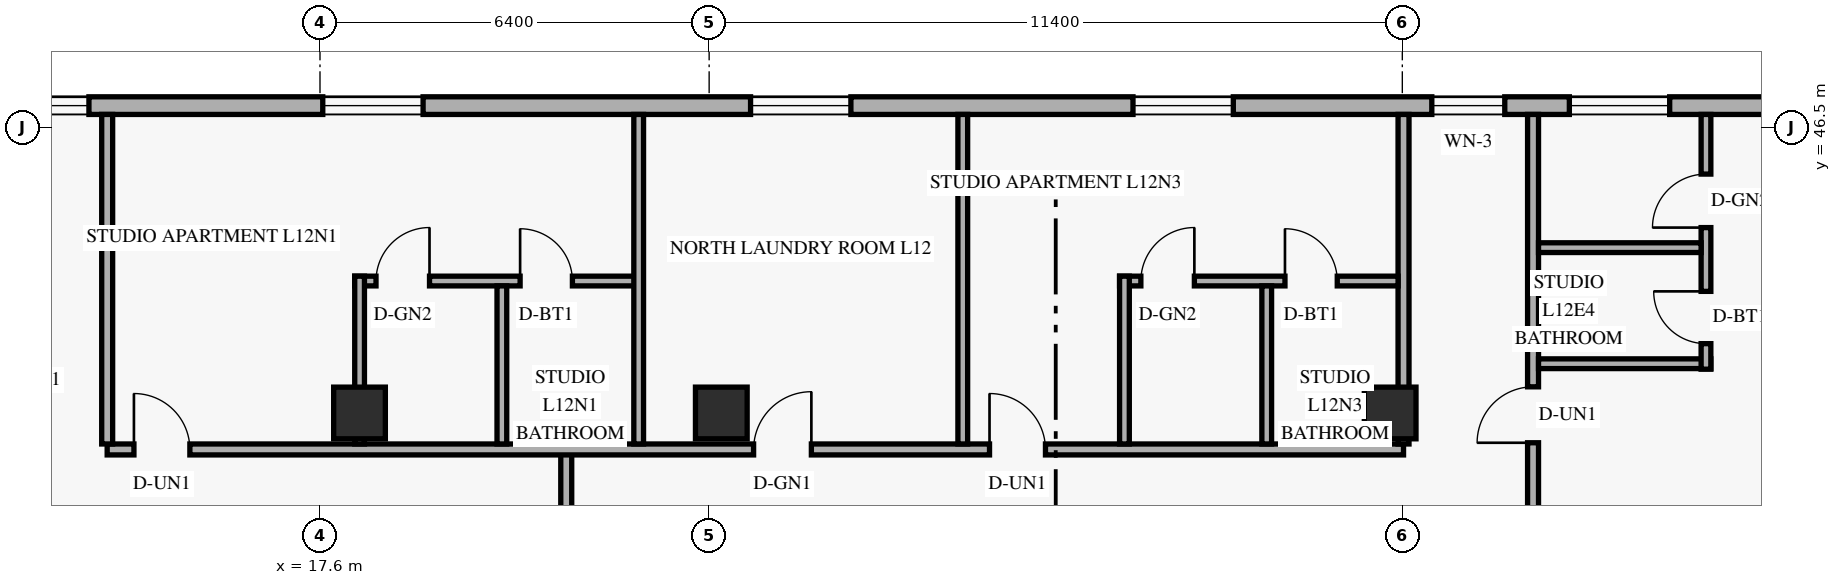
"""IFC4 building model, lengths in metres.
Left out: names, types, materials, properties, quantities, classifications, styles, units other than length and angle.
Written with IfcOpenShell. Run it as: python <this file> out.ifc"""

import sys

from ifc_helpers import new_model, si_unit, direction, frame, frame_2d, origin, origin_2d, place, context, subcontext, project, spatial, rectangle, extrude, element, fill, save


model = new_model("IFC4")
c1 = context("Model", 3, precision=1e-05, world=origin(), true_north=direction((0.0, 1.0)))
c2 = subcontext(c1, "Body", "Model", "MODEL_VIEW")
j1 = project(units=[si_unit("LENGTHUNIT", "METRE"), si_unit("PLANEANGLEUNIT", "RADIAN")], contexts=[c1])
p1 = place(None, origin())
s1 = spatial("IfcSite", under=j1, at=p1, CompositionType="ELEMENT")
p2 = place(p1, origin())
s2 = spatial("IfcBuilding", under=s1, at=p2, CompositionType="ELEMENT")
p3 = place(p2, frame((0.0, 0.0, 49.2)))
s3 = spatial("IfcBuildingStorey", under=s2, at=p3, CompositionType="ELEMENT", Elevation=49.2)
for number, where, z_axis, x_axis in (
    (1, (18.25, 41.8, 0.0), (0.0, 0.0, 1.0), (1.0, 0.0, 0.0)),
    (2, (24.2, 41.8, 0.0), (0.0, 0.0, 1.0), (1.0, 0.0, 0.0)),
    (3, (35.2, 41.8, 0.0), (0.0, 0.0, 1.0), (1.0, 0.0, 0.0)),
):
    element("IfcColumn", number, at=place(p3, frame(where, z_axis=z_axis, x_axis=x_axis)), inside=s3, PredefinedType="COLUMN", context=c2, shape_type="SweptSolid", body=[
        extrude(rectangle(XDim=0.85, YDim=0.85, at=origin_2d()), origin(), (0.0, 0.0, 1.0), 3.6),
    ])
p4 = place(p3, frame((44.98, 46.855, 0.0), z_axis=(0.0, 0.0, 1.0), x_axis=(-1.0, 0.0, 0.0)))
e4 = element("IfcWall", 4, at=p4, inside=s3, PredefinedType="SOLIDWALL", context=c2, shape_type="SweptSolid", body=[
    extrude(rectangle(XDim=39.56, YDim=0.29, at=frame_2d((19.78, 0.0))), origin(), (0.0, 0.0, 1.0), 3.36),
])
p5 = place(p4, frame((35.295, 0.0, 0.85)))
e5 = element("IfcOpeningElement", 5, at=p5, cuts=e4, PredefinedType="OPENING", context=c2, shape_type="SweptSolid", body=[
    extrude(rectangle(XDim=1.65, YDim=1.6, at=frame_2d((0.825, 0.8))), frame((0.0, 0.155, 0.0), z_axis=(0.0, -1.0, 0.0), x_axis=(1.0, 0.0, 0.0)), (0.0, 0.0, 1.0), 0.31),
])
p6 = place(p4, frame((31.18, 0.0, 0.85)))
e6 = element("IfcOpeningElement", 6, at=p6, cuts=e4, PredefinedType="OPENING", context=c2, shape_type="SweptSolid", body=[
    extrude(rectangle(XDim=1.2, YDim=1.5, at=frame_2d((0.6, 0.75))), frame((0.0, 0.155, 0.0), z_axis=(0.0, -1.0, 0.0), x_axis=(1.0, 0.0, 0.0)), (0.0, 0.0, 1.0), 0.31),
])
p7 = place(p4, frame((25.684, 0.0, 0.85)))
e7 = element("IfcOpeningElement", 7, at=p7, cuts=e4, PredefinedType="OPENING", context=c2, shape_type="SweptSolid", body=[
    extrude(rectangle(XDim=1.65, YDim=1.6, at=frame_2d((0.825, 0.8))), frame((0.0, 0.155, 0.0), z_axis=(0.0, -1.0, 0.0), x_axis=(1.0, 0.0, 0.0)), (0.0, 0.0, 1.0), 0.31),
])
p8 = place(p4, frame((18.649, 0.0, 0.85)))
e8 = element("IfcOpeningElement", 8, at=p8, cuts=e4, PredefinedType="OPENING", context=c2, shape_type="SweptSolid", body=[
    extrude(rectangle(XDim=1.65, YDim=1.6, at=frame_2d((0.825, 0.8))), frame((0.0, 0.155, 0.0), z_axis=(0.0, -1.0, 0.0), x_axis=(1.0, 0.0, 0.0)), (0.0, 0.0, 1.0), 0.31),
])
p9 = place(p4, frame((12.359, 0.0, 0.85)))
e9 = element("IfcOpeningElement", 9, at=p9, cuts=e4, PredefinedType="OPENING", context=c2, shape_type="SweptSolid", body=[
    extrude(rectangle(XDim=1.65, YDim=1.6, at=frame_2d((0.825, 0.8))), frame((0.0, 0.155, 0.0), z_axis=(0.0, -1.0, 0.0), x_axis=(1.0, 0.0, 0.0)), (0.0, 0.0, 1.0), 0.31),
])
p10 = place(p4, frame((7.895, 0.0, 0.85)))
e10 = element("IfcOpeningElement", 10, at=p10, cuts=e4, PredefinedType="OPENING", context=c2, shape_type="SweptSolid", body=[
    extrude(rectangle(XDim=1.2, YDim=1.5, at=frame_2d((0.6, 0.75))), frame((0.0, 0.155, 0.0), z_axis=(0.0, -1.0, 0.0), x_axis=(1.0, 0.0, 0.0)), (0.0, 0.0, 1.0), 0.31),
])
p11 = place(p4, frame((5.183, 0.0, 0.85)))
e11 = element("IfcOpeningElement", 11, at=p11, cuts=e4, PredefinedType="OPENING", context=c2, shape_type="SweptSolid", body=[
    extrude(rectangle(XDim=1.65, YDim=1.6, at=frame_2d((0.825, 0.8))), frame((0.0, 0.155, 0.0), z_axis=(0.0, -1.0, 0.0), x_axis=(1.0, 0.0, 0.0)), (0.0, 0.0, 1.0), 0.31),
])
p12 = place(p4, frame((1.468, 0.0, 0.85)))
e12 = element("IfcOpeningElement", 12, at=p12, cuts=e4, PredefinedType="OPENING", context=c2, shape_type="SweptSolid", body=[
    extrude(rectangle(XDim=1.65, YDim=1.6, at=frame_2d((0.825, 0.8))), frame((0.0, 0.155, 0.0), z_axis=(0.0, -1.0, 0.0), x_axis=(1.0, 0.0, 0.0)), (0.0, 0.0, 1.0), 0.31),
])
p13 = place(p3, frame((37.55, 1.29, 0.0), z_axis=(0.0, 0.0, 1.0), x_axis=(0.0, 1.0, 0.0)))
e13 = element("IfcWall", 13, at=p13, inside=s3, PredefinedType="STANDARD", context=c2, shape_type="SweptSolid", body=[
    extrude(rectangle(XDim=45.42, YDim=0.18, at=frame_2d((22.71, 0.0))), origin(), (0.0, 0.0, 1.0), 2.649),
])
p14 = place(p13, frame((4.46, 0.0, 0.0)))
e14 = element("IfcOpeningElement", 14, at=p14, cuts=e13, PredefinedType="OPENING", context=c2, shape_type="SweptSolid", body=[
    extrude(rectangle(XDim=0.92, YDim=2.15, at=frame_2d((0.46, 1.075))), frame((0.0, 0.1, 0.0), z_axis=(0.0, -1.0, 0.0), x_axis=(1.0, 0.0, 0.0)), (0.0, 0.0, 1.0), 0.2),
])
p15 = place(p13, frame((14.37, 0.0, 0.0)))
e15 = element("IfcOpeningElement", 15, at=p15, cuts=e13, PredefinedType="OPENING", context=c2, shape_type="SweptSolid", body=[
    extrude(rectangle(XDim=0.92, YDim=2.15, at=frame_2d((0.46, 1.075))), frame((0.0, 0.1, 0.0), z_axis=(0.0, -1.0, 0.0), x_axis=(1.0, 0.0, 0.0)), (0.0, 0.0, 1.0), 0.2),
])
p16 = place(p13, frame((25.87, 0.0, 0.0)))
e16 = element("IfcOpeningElement", 16, at=p16, cuts=e13, PredefinedType="OPENING", context=c2, shape_type="SweptSolid", body=[
    extrude(rectangle(XDim=0.92, YDim=2.15, at=frame_2d((0.46, 1.075))), frame((0.0, 0.1, 0.0), z_axis=(0.0, -1.0, 0.0), x_axis=(1.0, 0.0, 0.0)), (0.0, 0.0, 1.0), 0.2),
])
p17 = place(p13, frame((40.02, 0.0, 0.0)))
e17 = element("IfcOpeningElement", 17, at=p17, cuts=e13, PredefinedType="OPENING", context=c2, shape_type="SweptSolid", body=[
    extrude(rectangle(XDim=0.92, YDim=2.15, at=frame_2d((0.46, 1.075))), frame((0.0, 0.1, 0.0), z_axis=(0.0, -1.0, 0.0), x_axis=(1.0, 0.0, 0.0)), (0.0, 0.0, 1.0), 0.2),
])
p18 = place(p3, frame((21.65, 6.8, 0.0), z_axis=(0.0, 0.0, 1.0), x_axis=(0.0, 1.0, 0.0)))
e18 = element("IfcWall", 18, at=p18, inside=s3, PredefinedType="STANDARD", context=c2, shape_type="SweptSolid", body=[
    extrude(rectangle(XDim=34.4, YDim=0.18, at=frame_2d((17.2, 0.0))), origin(), (0.0, 0.0, 1.0), 2.649),
])
p19 = place(p3, frame((14.1, 41.2, 0.0), z_axis=(0.0, 0.0, 1.0), x_axis=(1.0, 0.0, 0.0)))
e19 = element("IfcWall", 19, at=p19, inside=s3, PredefinedType="STANDARD", context=c2, shape_type="SweptSolid", body=[
    extrude(rectangle(XDim=21.32, YDim=0.18, at=frame_2d((10.66, 0.0))), origin(), (0.0, 0.0, 1.0), 2.649),
])
p20 = place(p19, frame((0.44, 0.0, 0.0)))
e20 = element("IfcOpeningElement", 20, at=p20, cuts=e19, PredefinedType="OPENING", context=c2, shape_type="SweptSolid", body=[
    extrude(rectangle(XDim=0.92, YDim=2.15, at=frame_2d((0.46, 1.075))), frame((0.0, 0.1, 0.0), z_axis=(0.0, -1.0, 0.0), x_axis=(1.0, 0.0, 0.0)), (0.0, 0.0, 1.0), 0.2),
])
p21 = place(p19, frame((10.631, 0.0, 0.0)))
e21 = element("IfcOpeningElement", 21, at=p21, cuts=e19, PredefinedType="OPENING", context=c2, shape_type="SweptSolid", body=[
    extrude(rectangle(XDim=0.95, YDim=2.15, at=frame_2d((0.475, 1.075))), frame((0.0, 0.1, 0.0), z_axis=(0.0, -1.0, 0.0), x_axis=(1.0, 0.0, 0.0)), (0.0, 0.0, 1.0), 0.2),
])
p22 = place(p19, frame((14.511, 0.0, 0.0)))
e22 = element("IfcOpeningElement", 22, at=p22, cuts=e19, PredefinedType="OPENING", context=c2, shape_type="SweptSolid", body=[
    extrude(rectangle(XDim=0.92, YDim=2.15, at=frame_2d((0.46, 1.075))), frame((0.0, 0.1, 0.0), z_axis=(0.0, -1.0, 0.0), x_axis=(1.0, 0.0, 0.0)), (0.0, 0.0, 1.0), 0.2),
])
p23 = place(p3, frame((35.42, 41.29, 0.0), z_axis=(0.0, 0.0, 1.0), x_axis=(0.0, 1.0, 0.0)))
e23 = element("IfcWall", 23, at=p23, inside=s3, PredefinedType="PARTITIONING", context=c2, shape_type="SweptSolid", body=[
    extrude(rectangle(XDim=5.42, YDim=0.18, at=frame_2d((2.71, 0.0))), origin(), (0.0, 0.0, 1.0), 3.36),
])
p24 = place(p3, frame((14.1, 41.29, 0.0), z_axis=(0.0, 0.0, 1.0), x_axis=(0.0, 1.0, 0.0)))
e24 = element("IfcWall", 24, at=p24, inside=s3, PredefinedType="PARTITIONING", context=c2, shape_type="SweptSolid", body=[
    extrude(rectangle(XDim=5.42, YDim=0.18, at=frame_2d((2.71, 0.0))), origin(), (0.0, 0.0, 1.0), 2.809),
])
p25 = place(p3, frame((37.64, 42.61, 0.0), z_axis=(0.0, 0.0, 1.0), x_axis=(1.0, 0.0, 0.0)))
e25 = element("IfcWall", 25, at=p25, inside=s3, PredefinedType="PLUMBINGWALL", context=c2, shape_type="SweptSolid", body=[
    extrude(rectangle(XDim=2.834, YDim=0.16, at=frame_2d((1.417, 0.0))), origin(), (0.0, 0.0, 1.0), 3.36),
])
p26 = place(p3, frame((40.394, 42.52, 0.0), z_axis=(0.0, 0.0, 1.0), x_axis=(0.0, 1.0, 0.0)))
e26 = element("IfcWall", 26, at=p26, inside=s3, PredefinedType="PLUMBINGWALL", context=c2, shape_type="SweptSolid", body=[
    extrude(rectangle(XDim=4.19, YDim=0.16, at=frame_2d((2.095, 0.0))), origin(), (0.0, 0.0, 1.0), 3.36),
])
p27 = place(p26, frame((0.42, 0.0, 0.0)))
e27 = element("IfcOpeningElement", 27, at=p27, cuts=e26, PredefinedType="OPENING", context=c2, shape_type="SweptSolid", body=[
    extrude(rectangle(XDim=0.86, YDim=2.12, at=frame_2d((0.43, 1.06))), frame((0.0, 0.09, 0.0), z_axis=(0.0, -1.0, 0.0), x_axis=(1.0, 0.0, 0.0)), (0.0, 0.0, 1.0), 0.18),
])
p28 = place(p26, frame((2.329, 0.0, 0.0)))
e28 = element("IfcOpeningElement", 28, at=p28, cuts=e26, PredefinedType="OPENING", context=c2, shape_type="SweptSolid", body=[
    extrude(rectangle(XDim=0.88, YDim=2.12, at=frame_2d((0.44, 1.06))), frame((0.0, 0.09, 0.0), z_axis=(0.0, -1.0, 0.0), x_axis=(1.0, 0.0, 0.0)), (0.0, 0.0, 1.0), 0.18),
])
p29 = place(p3, frame((37.64, 44.519, 0.0), z_axis=(0.0, 0.0, 1.0), x_axis=(1.0, 0.0, 0.0)))
e29 = element("IfcWall", 29, at=p29, inside=s3, PredefinedType="PLUMBINGWALL", context=c2, shape_type="SweptSolid", body=[
    extrude(rectangle(XDim=2.674, YDim=0.16, at=frame_2d((1.337, 0.0))), origin(), (0.0, 0.0, 1.0), 3.36),
])
p30 = place(p3, frame((18.171, 43.97, 0.0), z_axis=(0.0, 0.0, 1.0), x_axis=(1.0, 0.0, 0.0)))
e30 = element("IfcWall", 30, at=p30, inside=s3, PredefinedType="PLUMBINGWALL", context=c2, shape_type="SweptSolid", body=[
    extrude(rectangle(XDim=4.67, YDim=0.16, at=frame_2d((2.335, 0.0))), origin(), (0.0, 0.0, 1.0), 3.36),
])
p31 = place(p30, frame((0.35, 0.0, 0.0)))
e31 = element("IfcOpeningElement", 31, at=p31, cuts=e30, PredefinedType="OPENING", context=c2, shape_type="SweptSolid", body=[
    extrude(rectangle(XDim=0.88, YDim=2.12, at=frame_2d((0.44, 1.06))), frame((0.0, 0.09, 0.0), z_axis=(0.0, -1.0, 0.0), x_axis=(1.0, 0.0, 0.0)), (0.0, 0.0, 1.0), 0.18),
])
p32 = place(p30, frame((2.72, 0.0, 0.0)))
e32 = element("IfcOpeningElement", 32, at=p32, cuts=e30, PredefinedType="OPENING", context=c2, shape_type="SweptSolid", body=[
    extrude(rectangle(XDim=0.86, YDim=2.12, at=frame_2d((0.43, 1.06))), frame((0.0, 0.09, 0.0), z_axis=(0.0, -1.0, 0.0), x_axis=(1.0, 0.0, 0.0)), (0.0, 0.0, 1.0), 0.18),
])
p33 = place(p3, frame((18.251, 41.29, 0.0), z_axis=(0.0, 0.0, 1.0), x_axis=(0.0, 1.0, 0.0)))
e33 = element("IfcWall", 33, at=p33, inside=s3, PredefinedType="PLUMBINGWALL", context=c2, shape_type="SweptSolid", body=[
    extrude(rectangle(XDim=2.76, YDim=0.16, at=frame_2d((1.38, 0.0))), origin(), (0.0, 0.0, 1.0), 2.649),
])
p34 = place(p3, frame((20.591, 41.29, 0.0), z_axis=(0.0, 0.0, 1.0), x_axis=(0.0, 1.0, 0.0)))
e34 = element("IfcWall", 34, at=p34, inside=s3, PredefinedType="PLUMBINGWALL", context=c2, shape_type="SweptSolid", body=[
    extrude(rectangle(XDim=2.6, YDim=0.16, at=frame_2d((1.3, 0.0))), origin(), (0.0, 0.0, 1.0), 2.809),
])
for number, where, z_axis, x_axis in (
    (35, (22.841, 41.29, 0.0), (0.0, 0.0, 1.0), (0.0, 1.0, 0.0)),
    (36, (28.171, 41.29, 0.0), (0.0, 0.0, 1.0), (0.0, 1.0, 0.0)),
):
    element("IfcWall", number, at=place(p3, frame(where, z_axis=z_axis, x_axis=x_axis)), inside=s3, PredefinedType="PARTITIONING", context=c2, shape_type="SweptSolid", body=[
        extrude(rectangle(XDim=5.42, YDim=0.16, at=frame_2d((2.71, 0.0))), origin(), (0.0, 0.0, 1.0), 2.809),
    ])
p35 = place(p3, frame((30.75, 43.97, 0.0), z_axis=(0.0, 0.0, 1.0), x_axis=(1.0, 0.0, 0.0)))
e37 = element("IfcWall", 37, at=p35, inside=s3, PredefinedType="PLUMBINGWALL", context=c2, shape_type="SweptSolid", body=[
    extrude(rectangle(XDim=4.58, YDim=0.16, at=frame_2d((2.29, 0.0))), origin(), (0.0, 0.0, 1.0), 3.36),
])
p36 = place(p35, frame((0.35, 0.0, 0.0)))
e38 = element("IfcOpeningElement", 38, at=p36, cuts=e37, PredefinedType="OPENING", context=c2, shape_type="SweptSolid", body=[
    extrude(rectangle(XDim=0.88, YDim=2.12, at=frame_2d((0.44, 1.06))), frame((0.0, 0.09, 0.0), z_axis=(0.0, -1.0, 0.0), x_axis=(1.0, 0.0, 0.0)), (0.0, 0.0, 1.0), 0.18),
])
p37 = place(p35, frame((2.72, 0.0, 0.0)))
e39 = element("IfcOpeningElement", 39, at=p37, cuts=e37, PredefinedType="OPENING", context=c2, shape_type="SweptSolid", body=[
    extrude(rectangle(XDim=0.86, YDim=2.12, at=frame_2d((0.43, 1.06))), frame((0.0, 0.09, 0.0), z_axis=(0.0, -1.0, 0.0), x_axis=(1.0, 0.0, 0.0)), (0.0, 0.0, 1.0), 0.18),
])
p38 = place(p3, frame((30.83, 41.29, 0.0), z_axis=(0.0, 0.0, 1.0), x_axis=(0.0, 1.0, 0.0)))
e40 = element("IfcWall", 40, at=p38, inside=s3, PredefinedType="PLUMBINGWALL", context=c2, shape_type="SweptSolid", body=[
    extrude(rectangle(XDim=2.76, YDim=0.16, at=frame_2d((1.38, 0.0))), origin(), (0.0, 0.0, 1.0), 2.809),
])
p39 = place(p3, frame((33.17, 41.29, 0.0), z_axis=(0.0, 0.0, 1.0), x_axis=(0.0, 1.0, 0.0)))
e41 = element("IfcWall", 41, at=p39, inside=s3, PredefinedType="PLUMBINGWALL", context=c2, shape_type="SweptSolid", body=[
    extrude(rectangle(XDim=2.6, YDim=0.16, at=frame_2d((1.3, 0.0))), origin(), (0.0, 0.0, 1.0), 2.809),
])
p40 = place(p6, origin())
e42 = element("IfcWindow", 42, at=p40, inside=s3, PartitioningType="SINGLE_PANEL", PredefinedType="WINDOW", context=c2, shape_type="SweptSolid", body=[
    extrude(rectangle(XDim=1.2, YDim=1.5, at=frame_2d((0.6, 0.75))), frame((0.0, 0.03, 0.0), z_axis=(0.0, -1.0, 0.0), x_axis=(1.0, 0.0, 0.0)), (0.0, 0.0, 1.0), 0.06),
])
fill(e6, e42)
p41 = place(p7, origin())
e43 = element("IfcWindow", 43, at=p41, inside=s3, PartitioningType="SINGLE_PANEL", PredefinedType="WINDOW", context=c2, shape_type="SweptSolid", body=[
    extrude(rectangle(XDim=1.65, YDim=1.6, at=frame_2d((0.825, 0.8))), frame((0.0, 0.03, 0.0), z_axis=(0.0, -1.0, 0.0), x_axis=(1.0, 0.0, 0.0)), (0.0, 0.0, 1.0), 0.06),
])
fill(e7, e43)
p42 = place(p8, origin())
e44 = element("IfcWindow", 44, at=p42, inside=s3, PartitioningType="SINGLE_PANEL", PredefinedType="WINDOW", context=c2, shape_type="SweptSolid", body=[
    extrude(rectangle(XDim=1.65, YDim=1.6, at=frame_2d((0.825, 0.8))), frame((0.0, 0.03, 0.0), z_axis=(0.0, -1.0, 0.0), x_axis=(1.0, 0.0, 0.0)), (0.0, 0.0, 1.0), 0.06),
])
fill(e8, e44)
p43 = place(p9, origin())
e45 = element("IfcWindow", 45, at=p43, inside=s3, PartitioningType="SINGLE_PANEL", PredefinedType="WINDOW", context=c2, shape_type="SweptSolid", body=[
    extrude(rectangle(XDim=1.65, YDim=1.6, at=frame_2d((0.825, 0.8))), frame((0.0, 0.03, 0.0), z_axis=(0.0, -1.0, 0.0), x_axis=(1.0, 0.0, 0.0)), (0.0, 0.0, 1.0), 0.06),
])
fill(e9, e45)
p44 = place(p10, origin())
e46 = element("IfcWindow", 46, at=p44, inside=s3, PartitioningType="SINGLE_PANEL", PredefinedType="WINDOW", context=c2, shape_type="SweptSolid", body=[
    extrude(rectangle(XDim=1.2, YDim=1.5, at=frame_2d((0.6, 0.75))), frame((0.0, 0.03, 0.0), z_axis=(0.0, -1.0, 0.0), x_axis=(1.0, 0.0, 0.0)), (0.0, 0.0, 1.0), 0.06),
])
fill(e10, e46)
p45 = place(p11, origin())
e47 = element("IfcWindow", 47, at=p45, inside=s3, PartitioningType="SINGLE_PANEL", PredefinedType="WINDOW", context=c2, shape_type="SweptSolid", body=[
    extrude(rectangle(XDim=1.65, YDim=1.6, at=frame_2d((0.825, 0.8))), frame((0.0, 0.03, 0.0), z_axis=(0.0, -1.0, 0.0), x_axis=(1.0, 0.0, 0.0)), (0.0, 0.0, 1.0), 0.06),
])
fill(e11, e47)
p46 = place(p17, origin())
e48 = element("IfcDoor", 48, at=p46, inside=s3, OperationType="SINGLE_SWING_LEFT", PredefinedType="DOOR", context=c2, shape_type="SweptSolid", body=[
    extrude(rectangle(XDim=0.92, YDim=2.15, at=frame_2d((0.46, 1.075))), frame((0.0, 0.025, 0.0), z_axis=(0.0, -1.0, 0.0), x_axis=(1.0, 0.0, 0.0)), (0.0, 0.0, 1.0), 0.05),
])
fill(e17, e48)
p47 = place(p27, origin())
e49 = element("IfcDoor", 49, at=p47, inside=s3, OperationType="SINGLE_SWING_RIGHT", PredefinedType="DOOR", context=c2, shape_type="SweptSolid", body=[
    extrude(rectangle(XDim=0.86, YDim=2.12, at=frame_2d((0.43, 1.06))), frame((0.0, 0.025, 0.0), z_axis=(0.0, -1.0, 0.0), x_axis=(1.0, 0.0, 0.0)), (0.0, 0.0, 1.0), 0.05),
])
fill(e27, e49)
p48 = place(p28, origin())
e50 = element("IfcDoor", 50, at=p48, inside=s3, OperationType="SINGLE_SWING_LEFT", PredefinedType="DOOR", context=c2, shape_type="SweptSolid", body=[
    extrude(rectangle(XDim=0.88, YDim=2.12, at=frame_2d((0.44, 1.06))), frame((0.0, 0.025, 0.0), z_axis=(0.0, -1.0, 0.0), x_axis=(1.0, 0.0, 0.0)), (0.0, 0.0, 1.0), 0.05),
])
fill(e28, e50)
p49 = place(p20, origin())
e51 = element("IfcDoor", 51, at=p49, inside=s3, OperationType="SINGLE_SWING_LEFT", PredefinedType="DOOR", context=c2, shape_type="SweptSolid", body=[
    extrude(rectangle(XDim=0.92, YDim=2.15, at=frame_2d((0.46, 1.075))), frame((0.0, 0.025, 0.0), z_axis=(0.0, -1.0, 0.0), x_axis=(1.0, 0.0, 0.0)), (0.0, 0.0, 1.0), 0.05),
])
fill(e20, e51)
p50 = place(p31, origin())
e52 = element("IfcDoor", 52, at=p50, inside=s3, OperationType="SINGLE_SWING_RIGHT", PredefinedType="DOOR", context=c2, shape_type="SweptSolid", body=[
    extrude(rectangle(XDim=0.88, YDim=2.12, at=frame_2d((0.44, 1.06))), frame((0.0, 0.025, 0.0), z_axis=(0.0, -1.0, 0.0), x_axis=(1.0, 0.0, 0.0)), (0.0, 0.0, 1.0), 0.05),
])
fill(e31, e52)
p51 = place(p32, origin())
e53 = element("IfcDoor", 53, at=p51, inside=s3, OperationType="SINGLE_SWING_LEFT", PredefinedType="DOOR", context=c2, shape_type="SweptSolid", body=[
    extrude(rectangle(XDim=0.86, YDim=2.12, at=frame_2d((0.43, 1.06))), frame((0.0, 0.025, 0.0), z_axis=(0.0, -1.0, 0.0), x_axis=(1.0, 0.0, 0.0)), (0.0, 0.0, 1.0), 0.05),
])
fill(e32, e53)
p52 = place(p21, origin())
e54 = element("IfcDoor", 54, at=p52, inside=s3, OperationType="SINGLE_SWING_RIGHT", PredefinedType="DOOR", context=c2, shape_type="SweptSolid", body=[
    extrude(rectangle(XDim=0.95, YDim=2.15, at=frame_2d((0.475, 1.075))), frame((0.0, 0.025, 0.0), z_axis=(0.0, -1.0, 0.0), x_axis=(1.0, 0.0, 0.0)), (0.0, 0.0, 1.0), 0.05),
])
fill(e21, e54)
p53 = place(p22, origin())
e55 = element("IfcDoor", 55, at=p53, inside=s3, OperationType="SINGLE_SWING_LEFT", PredefinedType="DOOR", context=c2, shape_type="SweptSolid", body=[
    extrude(rectangle(XDim=0.92, YDim=2.15, at=frame_2d((0.46, 1.075))), frame((0.0, 0.025, 0.0), z_axis=(0.0, -1.0, 0.0), x_axis=(1.0, 0.0, 0.0)), (0.0, 0.0, 1.0), 0.05),
])
fill(e22, e55)
p54 = place(p36, origin())
e56 = element("IfcDoor", 56, at=p54, inside=s3, OperationType="SINGLE_SWING_RIGHT", PredefinedType="DOOR", context=c2, shape_type="SweptSolid", body=[
    extrude(rectangle(XDim=0.88, YDim=2.12, at=frame_2d((0.44, 1.06))), frame((0.0, 0.025, 0.0), z_axis=(0.0, -1.0, 0.0), x_axis=(1.0, 0.0, 0.0)), (0.0, 0.0, 1.0), 0.05),
])
fill(e38, e56)
p55 = place(p37, origin())
e57 = element("IfcDoor", 57, at=p55, inside=s3, OperationType="SINGLE_SWING_LEFT", PredefinedType="DOOR", context=c2, shape_type="SweptSolid", body=[
    extrude(rectangle(XDim=0.86, YDim=2.12, at=frame_2d((0.43, 1.06))), frame((0.0, 0.025, 0.0), z_axis=(0.0, -1.0, 0.0), x_axis=(1.0, 0.0, 0.0)), (0.0, 0.0, 1.0), 0.05),
])
fill(e39, e57)
save(model, sys.argv[1])
